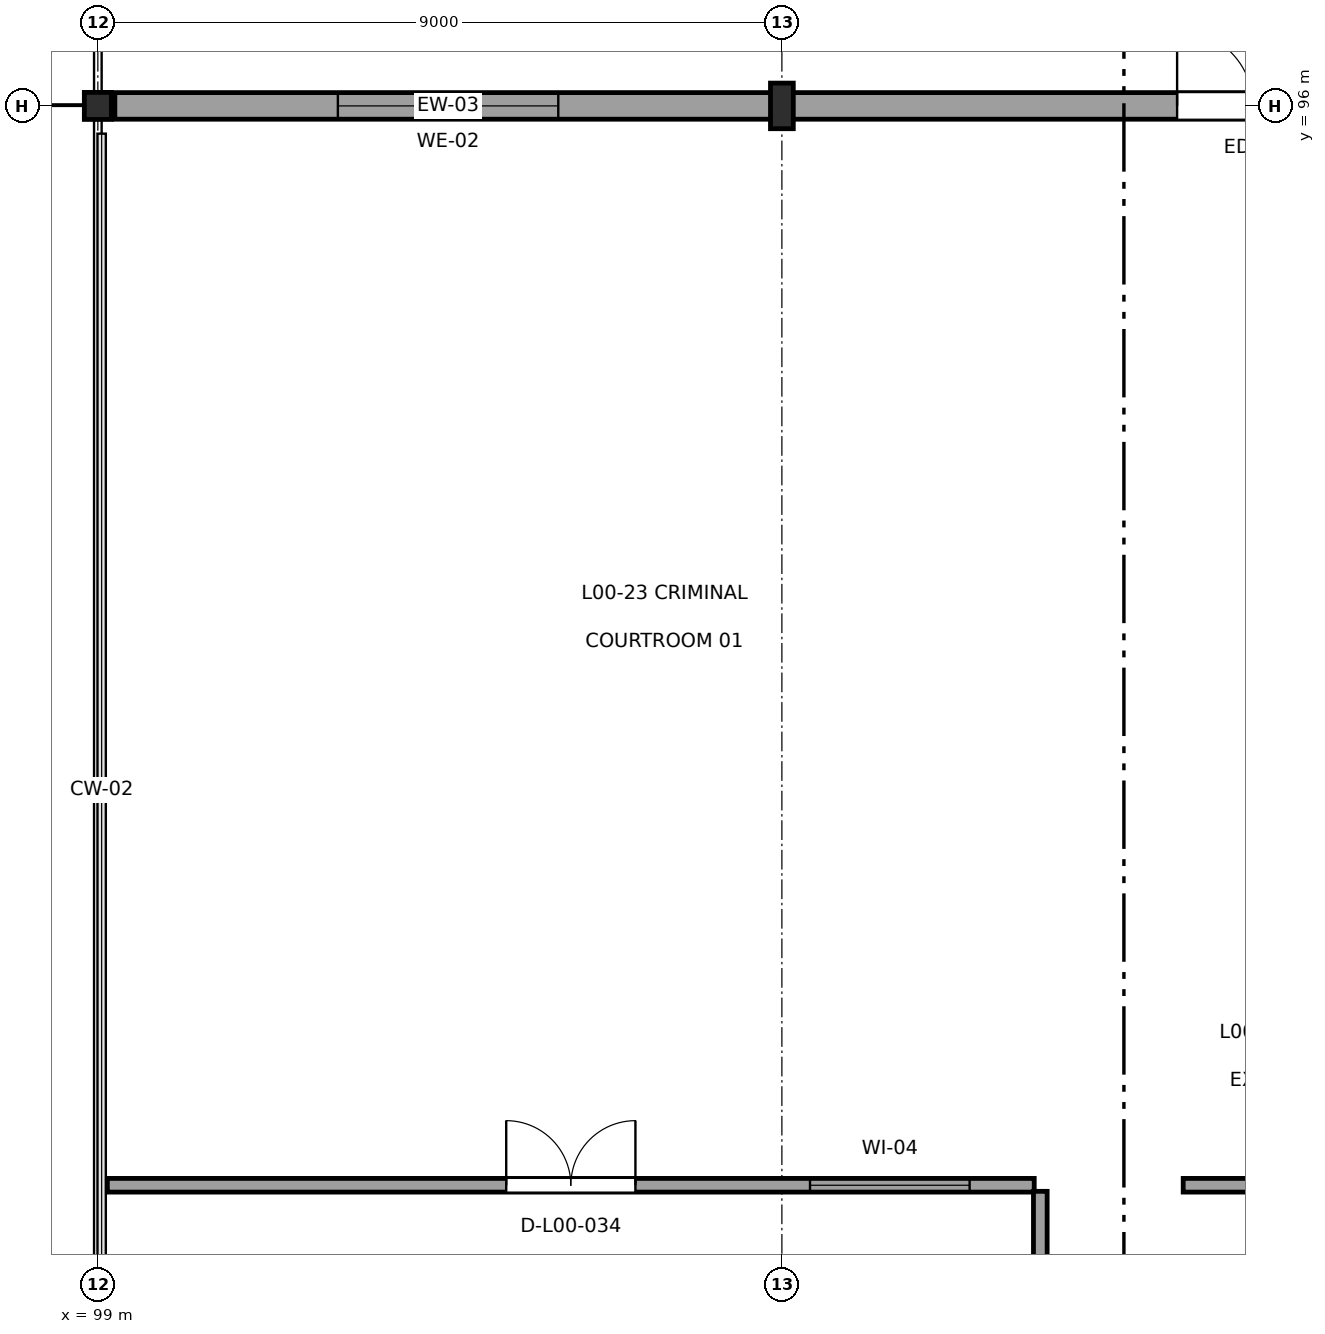
"""IFC4 building model, lengths in metres.
Left out: names, types, materials, properties, quantities, classifications, styles, units other than length and angle.
Written with IfcOpenShell. Run it as: python <this file> out.ifc"""

import sys

from ifc_helpers import new_model, si_unit, direction, frame, frame_2d, origin, origin_2d, place, context, subcontext, project, spatial, rectangle, hollow_circle, i_section, extrude, element, fill, save


model = new_model("IFC4")
c1 = context("Model", 3, precision=1e-05, world=origin(), true_north=direction((0.0, 1.0)))
c2 = subcontext(c1, "Body", "Model", "MODEL_VIEW")
j1 = project(units=[si_unit("LENGTHUNIT", "METRE"), si_unit("PLANEANGLEUNIT", "RADIAN")], contexts=[c1])
p1 = place(None, origin())
s1 = spatial("IfcSite", under=j1, at=p1, CompositionType="ELEMENT")
p2 = place(p1, origin())
s2 = spatial("IfcBuilding", under=s1, at=p2, CompositionType="ELEMENT")
p3 = place(p2, origin())
s3 = spatial("IfcBuildingStorey", under=s2, at=p3, CompositionType="ELEMENT", Elevation=0.0)
p4 = place(p3, frame((99.0, 96.0, 0.0), z_axis=(0.0, 0.0, 1.0), x_axis=(1.0, 0.0, 0.0)))
e1 = element("IfcColumn", 1, at=p4, inside=s3, PredefinedType="PILASTER", context=c2, shape_type="SweptSolid", body=[
    extrude(hollow_circle(Radius=0.178, WallThickness=0.016, at=origin_2d()), origin(), (0.0, 0.0, 1.0), 5.4),
])
p5 = place(p3, frame((108.0, 96.0, 0.0), z_axis=(0.0, 0.0, 1.0), x_axis=(1.0, 0.0, 0.0)))
e2 = element("IfcColumn", 2, at=p5, inside=s3, PredefinedType="COLUMN", context=c2, shape_type="SweptSolid", body=[
    extrude(i_section(OverallWidth=0.3, OverallDepth=0.6, WebThickness=0.015, FlangeThickness=0.03, at=origin_2d()), origin(), (0.0, 0.0, 1.0), 5.4),
])
p6 = place(p3, frame((116.992, 96.0, 0.0), z_axis=(0.0, 0.0, 1.0), x_axis=(-1.0, 0.0, 0.0)))
e3 = element("IfcWall", 3, at=p6, inside=s3, PredefinedType="SOLIDWALL", context=c2, shape_type="SweptSolid", body=[
    extrude(rectangle(XDim=8.984, YDim=0.35, at=frame_2d((4.492, 0.0))), origin(), (0.0, 0.0, 1.0), 4.545),
])
p7 = place(p6, frame((1.792, 0.0, 0.0)))
e4 = element("IfcOpeningElement", 4, at=p7, cuts=e3, PredefinedType="OPENING", context=c2, shape_type="SweptSolid", body=[
    extrude(rectangle(XDim=2.0, YDim=2.5, at=frame_2d((1.0, 1.25))), frame((0.0, 0.19, 0.0), z_axis=(0.0, -1.0, 0.0), x_axis=(1.0, 0.0, 0.0)), (0.0, 0.0, 1.0), 0.38),
])
p8 = place(p3, frame((107.992, 96.0, 0.0), z_axis=(0.0, 0.0, 1.0), x_axis=(-1.0, 0.0, 0.0)))
e5 = element("IfcWall", 5, at=p8, inside=s3, PredefinedType="SOLIDWALL", context=c2, shape_type="SweptSolid", body=[
    extrude(rectangle(XDim=8.768, YDim=0.35, at=frame_2d((4.384, 0.0))), origin(), (0.0, 0.0, 1.0), 4.605),
])
p9 = place(p8, frame((2.934, 0.0, 0.65)))
e6 = element("IfcOpeningElement", 6, at=p9, cuts=e5, PredefinedType="OPENING", context=c2, shape_type="SweptSolid", body=[
    extrude(rectangle(XDim=2.9, YDim=2.9, at=frame_2d((1.45, 1.45))), frame((0.0, 0.19, 0.0), z_axis=(0.0, -1.0, 0.0), x_axis=(1.0, 0.0, 0.0)), (0.0, 0.0, 1.0), 0.38),
])
p10 = place(p3, frame((99.125, 81.8, 0.0), z_axis=(0.0, 0.0, 1.0), x_axis=(1.0, 0.0, 0.0)))
e7 = element("IfcWall", 7, at=p10, inside=s3, PredefinedType="PARTITIONING", context=c2, shape_type="SweptSolid", body=[
    extrude(rectangle(XDim=12.195, YDim=0.18, at=frame_2d((6.098, 0.0))), origin(), (0.0, 0.0, 1.0), 5.04),
])
p11 = place(p10, frame((5.248, 0.0, 0.0)))
e8 = element("IfcOpeningElement", 8, at=p11, cuts=e7, PredefinedType="OPENING", context=c2, shape_type="SweptSolid", body=[
    extrude(rectangle(XDim=1.7, YDim=2.4, at=frame_2d((0.85, 1.2))), frame((0.0, 0.105, 0.0), z_axis=(0.0, -1.0, 0.0), x_axis=(1.0, 0.0, 0.0)), (0.0, 0.0, 1.0), 0.21),
])
p12 = place(p10, frame((9.245, 0.0, 1.05)))
e9 = element("IfcOpeningElement", 9, at=p12, cuts=e7, PredefinedType="OPENING", context=c2, shape_type="SweptSolid", body=[
    extrude(rectangle(XDim=2.1, YDim=1.2, at=frame_2d((1.05, 0.6))), frame((0.0, 0.105, 0.0), z_axis=(0.0, -1.0, 0.0), x_axis=(1.0, 0.0, 0.0)), (0.0, 0.0, 1.0), 0.21),
])
p13 = place(p3, frame((111.4, 81.72, 0.0), z_axis=(0.0, 0.0, 1.0), x_axis=(0.0, -1.0, 0.0)))
e10 = element("IfcWall", 10, at=p13, inside=s3, PredefinedType="PARTITIONING", context=c2, shape_type="SweptSolid", body=[
    extrude(rectangle(XDim=23.64, YDim=0.18, at=frame_2d((11.82, 0.0))), origin(), (0.0, 0.0, 1.0), 5.04),
])
p14 = place(p13, frame((11.095, 0.0, 0.0)))
e11 = element("IfcOpeningElement", 11, at=p14, cuts=e10, PredefinedType="OPENING", context=c2, shape_type="SweptSolid", body=[
    extrude(rectangle(XDim=1.45, YDim=2.2, at=frame_2d((0.725, 1.1))), frame((0.0, 0.105, 0.0), z_axis=(0.0, -1.0, 0.0), x_axis=(1.0, 0.0, 0.0)), (0.0, 0.0, 1.0), 0.21),
])
p15 = place(p3, frame((125.72, 81.8, 0.0), z_axis=(0.0, 0.0, 1.0), x_axis=(-1.0, 0.0, 0.0)))
e12 = element("IfcWall", 12, at=p15, inside=s3, PredefinedType="PARTITIONING", context=c2, shape_type="SweptSolid", body=[
    extrude(rectangle(XDim=12.44, YDim=0.18, at=frame_2d((6.22, 0.0))), origin(), (0.0, 0.0, 1.0), 5.04),
])
p16 = place(p15, frame((5.495, 0.0, 0.0)))
e13 = element("IfcOpeningElement", 13, at=p16, cuts=e12, PredefinedType="OPENING", context=c2, shape_type="SweptSolid", body=[
    extrude(rectangle(XDim=1.45, YDim=2.2, at=frame_2d((0.725, 1.1))), frame((0.0, 0.105, 0.0), z_axis=(0.0, -1.0, 0.0), x_axis=(1.0, 0.0, 0.0)), (0.0, 0.0, 1.0), 0.21),
])
p17 = place(p7, frame((2.0, 0.0, 0.0), z_axis=(0.0, 0.0, 1.0), x_axis=(-1.0, 0.0, 0.0)))
e14 = element("IfcDoor", 14, at=p17, inside=s3, OperationType="DOUBLE_DOOR_SINGLE_SWING", PredefinedType="DOOR", context=c2, shape_type="SweptSolid", body=[
    extrude(rectangle(XDim=2.0, YDim=2.5, at=frame_2d((1.0, 1.25))), frame((0.0, 0.025, 0.0), z_axis=(0.0, -1.0, 0.0), x_axis=(1.0, 0.0, 0.0)), (0.0, 0.0, 1.0), 0.05),
])
fill(e4, e14)
p18 = place(p9, origin())
e15 = element("IfcWindow", 15, at=p18, inside=s3, PartitioningType="SINGLE_PANEL", PredefinedType="WINDOW", context=c2, shape_type="SweptSolid", body=[
    extrude(rectangle(XDim=2.9, YDim=2.9, at=frame_2d((1.45, 1.45))), frame((0.0, 0.03, 0.0), z_axis=(0.0, -1.0, 0.0), x_axis=(1.0, 0.0, 0.0)), (0.0, 0.0, 1.0), 0.06),
])
fill(e6, e15)
p19 = place(p11, origin())
e16 = element("IfcDoor", 16, at=p19, inside=s3, OperationType="DOUBLE_DOOR_SINGLE_SWING", PredefinedType="DOOR", context=c2, shape_type="SweptSolid", body=[
    extrude(rectangle(XDim=1.7, YDim=2.4, at=frame_2d((0.85, 1.2))), frame((0.0, 0.025, 0.0), z_axis=(0.0, -1.0, 0.0), x_axis=(1.0, 0.0, 0.0)), (0.0, 0.0, 1.0), 0.05),
])
fill(e8, e16)
p20 = place(p12, origin())
e17 = element("IfcWindow", 17, at=p20, inside=s3, PartitioningType="SINGLE_PANEL", PredefinedType="WINDOW", context=c2, shape_type="SweptSolid", body=[
    extrude(rectangle(XDim=2.1, YDim=1.2, at=frame_2d((1.05, 0.6))), frame((0.0, 0.03, 0.0), z_axis=(0.0, -1.0, 0.0), x_axis=(1.0, 0.0, 0.0)), (0.0, 0.0, 1.0), 0.06),
])
fill(e9, e17)
save(model, sys.argv[1])
